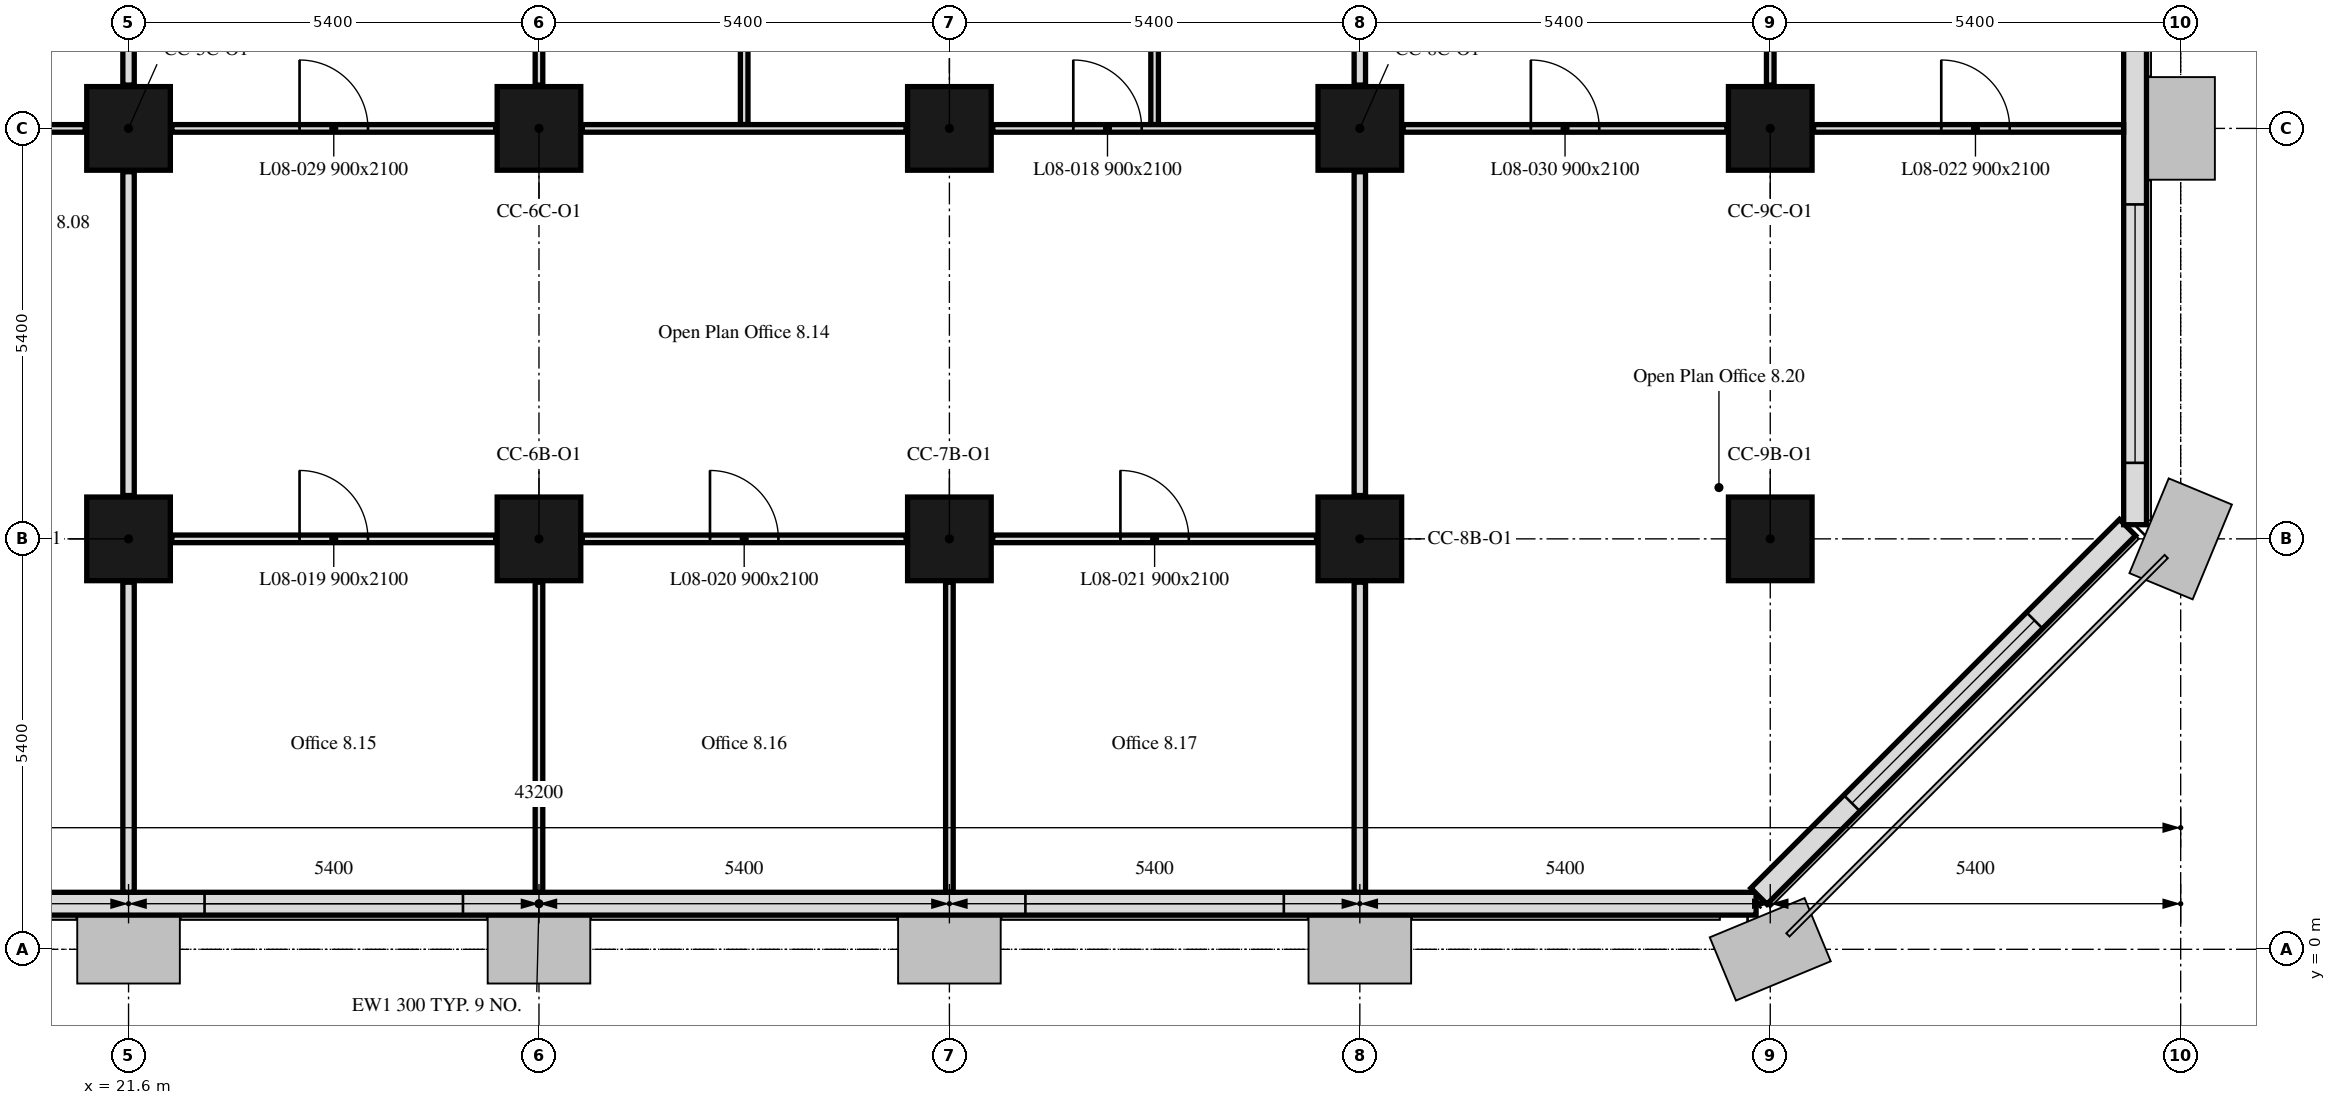
"""IFC4 building model, lengths in metres.
Left out: names, types, materials, properties, quantities, classifications, styles, units other than length and angle.
Written with IfcOpenShell. Run it as: python <this file> out.ifc"""

import sys

from ifc_helpers import new_model, si_unit, direction, frame, frame_2d, origin, origin_2d, place, context, subcontext, project, spatial, rectangle, extrude, element, fill, save


model = new_model("IFC4")
c1 = context("Model", 3, precision=1e-05, world=origin(), true_north=direction((0.0, 1.0)))
c2 = subcontext(c1, "Body", "Model", "MODEL_VIEW")
j1 = project(units=[si_unit("LENGTHUNIT", "METRE"), si_unit("PLANEANGLEUNIT", "RADIAN")], contexts=[c1])
p1 = place(None, origin())
s1 = spatial("IfcSite", under=j1, at=p1, CompositionType="ELEMENT")
p2 = place(p1, origin())
s2 = spatial("IfcBuilding", under=s1, at=p2, CompositionType="ELEMENT")
p3 = place(p2, frame((0.0, 0.0, 41.2)))
s3 = spatial("IfcBuildingStorey", under=s2, at=p3, CompositionType="ELEMENT", Elevation=41.2)
for number, where, z_axis, x_axis in (
    (1, (21.6, 5.4, 0.0), (0.0, 0.0, 1.0), (1.0, 0.0, 0.0)),
    (2, (27.0, 5.4, 0.0), (0.0, 0.0, 1.0), (1.0, 0.0, 0.0)),
    (3, (32.4, 5.4, 0.0), (0.0, 0.0, 1.0), (1.0, 0.0, 0.0)),
    (4, (37.8, 5.4, 0.0), (0.0, 0.0, 1.0), (1.0, 0.0, 0.0)),
    (5, (43.2, 5.4, 0.0), (0.0, 0.0, 1.0), (1.0, 0.0, 0.0)),
    (6, (21.6, 10.8, 0.0), (0.0, 0.0, 1.0), (1.0, 0.0, 0.0)),
    (7, (27.0, 10.8, 0.0), (0.0, 0.0, 1.0), (1.0, 0.0, 0.0)),
    (8, (32.4, 10.8, 0.0), (0.0, 0.0, 1.0), (1.0, 0.0, 0.0)),
    (9, (37.8, 10.8, 0.0), (0.0, 0.0, 1.0), (1.0, 0.0, 0.0)),
    (10, (43.2, 10.8, 0.0), (0.0, 0.0, 1.0), (1.0, 0.0, 0.0)),
):
    element("IfcColumn", number, at=place(p3, frame(where, z_axis=z_axis, x_axis=x_axis)), inside=s3, PredefinedType="COLUMN", context=c2, shape_type="SweptSolid", body=[
        extrude(rectangle(XDim=1.1, YDim=1.1, at=origin_2d()), origin(), (0.0, 0.0, 1.0), 3.5),
    ])
p4 = place(p3, frame((10.986, 0.6, 0.0), z_axis=(0.0, 0.0, 1.0), x_axis=(1.0, 0.0, 0.0)))
e11 = element("IfcWall", 11, at=p4, inside=s3, PredefinedType="SOLIDWALL", context=c2, shape_type="SweptSolid", body=[
    extrude(rectangle(XDim=32.027, YDim=0.3, at=frame_2d((16.014, 0.0))), origin(), (0.0, 0.0, 1.0), 3.5),
])
p5 = place(p4, frame((0.814, 0.0, 0.9)))
e12 = element("IfcOpeningElement", 12, at=p5, cuts=e11, PredefinedType="OPENING", context=c2, shape_type="SweptSolid", body=[
    extrude(rectangle(XDim=3.4, YDim=1.7, at=frame_2d((1.7, 0.85))), frame((0.0, 0.16, 0.0), z_axis=(0.0, -1.0, 0.0), x_axis=(1.0, 0.0, 0.0)), (0.0, 0.0, 1.0), 0.32),
])
p6 = place(p4, frame((11.614, 0.0, 0.9)))
e13 = element("IfcOpeningElement", 13, at=p6, cuts=e11, PredefinedType="OPENING", context=c2, shape_type="SweptSolid", body=[
    extrude(rectangle(XDim=3.4, YDim=1.7, at=frame_2d((1.7, 0.85))), frame((0.0, 0.16, 0.0), z_axis=(0.0, -1.0, 0.0), x_axis=(1.0, 0.0, 0.0)), (0.0, 0.0, 1.0), 0.32),
])
p7 = place(p4, frame((22.414, 0.0, 0.9)))
e14 = element("IfcOpeningElement", 14, at=p7, cuts=e11, PredefinedType="OPENING", context=c2, shape_type="SweptSolid", body=[
    extrude(rectangle(XDim=3.4, YDim=1.7, at=frame_2d((1.7, 0.85))), frame((0.0, 0.16, 0.0), z_axis=(0.0, -1.0, 0.0), x_axis=(1.0, 0.0, 0.0)), (0.0, 0.0, 1.0), 0.32),
])
p8 = place(p3, frame((43.051, 0.699, 0.0), z_axis=(0.0, 0.0, 1.0), x_axis=(0.707106781187, 0.707106781187, 0.0)))
e15 = element("IfcWall", 15, at=p8, inside=s3, PredefinedType="SOLIDWALL", context=c2, shape_type="SweptSolid", body=[
    extrude(rectangle(XDim=6.86, YDim=0.3, at=frame_2d((3.43, 0.0))), origin(), (0.0, 0.0, 1.0), 3.5),
])
p9 = place(p8, frame((1.73, 0.0, 0.9)))
e16 = element("IfcOpeningElement", 16, at=p9, cuts=e15, PredefinedType="OPENING", context=c2, shape_type="SweptSolid", body=[
    extrude(rectangle(XDim=3.4, YDim=1.7, at=frame_2d((1.7, 0.85))), frame((0.0, 0.16, 0.0), z_axis=(0.0, -1.0, 0.0), x_axis=(1.0, 0.0, 0.0)), (0.0, 0.0, 1.0), 0.32),
])
p10 = place(p3, frame((48.0, 5.586, 0.0), z_axis=(0.0, 0.0, 1.0), x_axis=(0.0, 1.0, 0.0)))
e17 = element("IfcWall", 17, at=p10, inside=s3, PredefinedType="SOLIDWALL", context=c2, shape_type="SweptSolid", body=[
    extrude(rectangle(XDim=32.027, YDim=0.3, at=frame_2d((16.014, 0.0))), origin(), (0.0, 0.0, 1.0), 3.5),
])
p11 = place(p10, frame((0.814, 0.0, 0.9)))
e18 = element("IfcOpeningElement", 18, at=p11, cuts=e17, PredefinedType="OPENING", context=c2, shape_type="SweptSolid", body=[
    extrude(rectangle(XDim=3.4, YDim=1.7, at=frame_2d((1.7, 0.85))), frame((0.0, 0.16, 0.0), z_axis=(0.0, -1.0, 0.0), x_axis=(1.0, 0.0, 0.0)), (0.0, 0.0, 1.0), 0.32),
])
p12 = place(p10, frame((11.614, 0.0, 0.9)))
e19 = element("IfcOpeningElement", 19, at=p12, cuts=e17, PredefinedType="OPENING", context=c2, shape_type="SweptSolid", body=[
    extrude(rectangle(XDim=3.4, YDim=1.7, at=frame_2d((1.7, 0.85))), frame((0.0, 0.16, 0.0), z_axis=(0.0, -1.0, 0.0), x_axis=(1.0, 0.0, 0.0)), (0.0, 0.0, 1.0), 0.32),
])
p13 = place(p10, frame((22.414, 0.0, 0.9)))
e20 = element("IfcOpeningElement", 20, at=p13, cuts=e17, PredefinedType="OPENING", context=c2, shape_type="SweptSolid", body=[
    extrude(rectangle(XDim=3.4, YDim=1.7, at=frame_2d((1.7, 0.85))), frame((0.0, 0.16, 0.0), z_axis=(0.0, -1.0, 0.0), x_axis=(1.0, 0.0, 0.0)), (0.0, 0.0, 1.0), 0.32),
])
p14 = place(p3, frame((16.77, 10.8, 0.0), z_axis=(0.0, 0.0, 1.0), x_axis=(1.0, 0.0, 0.0)))
e21 = element("IfcWall", 21, at=p14, inside=s3, PredefinedType="PARTITIONING", context=c2, shape_type="SweptSolid", body=[
    extrude(rectangle(XDim=4.26, YDim=0.1, at=frame_2d((2.13, 0.0))), origin(), (0.0, 0.0, 1.0), 3.5),
])
p15 = place(p3, frame((21.6, 11.37, 0.0), z_axis=(0.0, 0.0, 1.0), x_axis=(0.0, 1.0, 0.0)))
e22 = element("IfcWall", 22, at=p15, inside=s3, PredefinedType="PARTITIONING", context=c2, shape_type="SweptSolid", body=[
    extrude(rectangle(XDim=2.055, YDim=0.15, at=frame_2d((1.027, 0.0))), origin(), (0.0, 0.0, 1.0), 2.75),
])
p16 = place(p3, frame((21.6, 0.751, 0.0), z_axis=(0.0, 0.0, 1.0), x_axis=(0.0, 1.0, 0.0)))
e23 = element("IfcWall", 23, at=p16, inside=s3, PredefinedType="PARTITIONING", context=c2, shape_type="SweptSolid", body=[
    extrude(rectangle(XDim=4.079, YDim=0.15, at=frame_2d((2.04, 0.0))), origin(), (0.0, 0.0, 1.0), 2.75),
])
p17 = place(p3, frame((21.6, 5.97, 0.0), z_axis=(0.0, 0.0, 1.0), x_axis=(0.0, 1.0, 0.0)))
e24 = element("IfcWall", 24, at=p17, inside=s3, PredefinedType="PARTITIONING", context=c2, shape_type="SweptSolid", body=[
    extrude(rectangle(XDim=4.26, YDim=0.15, at=frame_2d((2.13, 0.0))), origin(), (0.0, 0.0, 1.0), 2.75),
])
p18 = place(p3, frame((22.17, 10.8, 0.0), z_axis=(0.0, 0.0, 1.0), x_axis=(1.0, 0.0, 0.0)))
e25 = element("IfcWall", 25, at=p18, inside=s3, PredefinedType="PARTITIONING", context=c2, shape_type="SweptSolid", body=[
    extrude(rectangle(XDim=4.26, YDim=0.1, at=frame_2d((2.13, 0.0))), origin(), (0.0, 0.0, 1.0), 3.5),
])
p19 = place(p18, frame((1.68, 0.0, 0.0)))
e26 = element("IfcOpeningElement", 26, at=p19, cuts=e25, PredefinedType="OPENING", context=c2, shape_type="SweptSolid", body=[
    extrude(rectangle(XDim=0.9, YDim=2.1, at=frame_2d((0.45, 1.05))), frame((0.0, 0.05, 0.0), z_axis=(0.0, -1.0, 0.0), x_axis=(1.0, 0.0, 0.0)), (0.0, 0.0, 1.0), 0.1),
])
p20 = place(p3, frame((27.0, 11.37, 0.0), z_axis=(0.0, 0.0, 1.0), x_axis=(0.0, 1.0, 0.0)))
e27 = element("IfcWall", 27, at=p20, inside=s3, PredefinedType="PARTITIONING", context=c2, shape_type="SweptSolid", body=[
    extrude(rectangle(XDim=2.055, YDim=0.1, at=frame_2d((1.027, 0.0))), origin(), (0.0, 0.0, 1.0), 2.75),
])
p21 = place(p3, frame((29.7, 10.85, 0.0), z_axis=(0.0, 0.0, 1.0), x_axis=(0.0, 1.0, 0.0)))
e28 = element("IfcWall", 28, at=p21, inside=s3, PredefinedType="PARTITIONING", context=c2, shape_type="SweptSolid", body=[
    extrude(rectangle(XDim=2.575, YDim=0.1, at=frame_2d((1.288, 0.0))), origin(), (0.0, 0.0, 1.0), 3.5),
])
p22 = place(p3, frame((27.57, 10.8, 0.0), z_axis=(0.0, 0.0, 1.0), x_axis=(1.0, 0.0, 0.0)))
e29 = element("IfcWall", 29, at=p22, inside=s3, PredefinedType="PARTITIONING", context=c2, shape_type="SweptSolid", body=[
    extrude(rectangle(XDim=4.26, YDim=0.1, at=frame_2d((2.13, 0.0))), origin(), (0.0, 0.0, 1.0), 3.5),
])
p23 = place(p3, frame((35.1, 10.85, 0.0), z_axis=(0.0, 0.0, 1.0), x_axis=(0.0, 1.0, 0.0)))
e30 = element("IfcWall", 30, at=p23, inside=s3, PredefinedType="PARTITIONING", context=c2, shape_type="SweptSolid", body=[
    extrude(rectangle(XDim=2.575, YDim=0.1, at=frame_2d((1.288, 0.0))), origin(), (0.0, 0.0, 1.0), 3.5),
])
p24 = place(p3, frame((32.97, 10.8, 0.0), z_axis=(0.0, 0.0, 1.0), x_axis=(1.0, 0.0, 0.0)))
e31 = element("IfcWall", 31, at=p24, inside=s3, PredefinedType="PARTITIONING", context=c2, shape_type="SweptSolid", body=[
    extrude(rectangle(XDim=4.26, YDim=0.1, at=frame_2d((2.13, 0.0))), origin(), (0.0, 0.0, 1.0), 2.75),
])
p25 = place(p24, frame((1.06, 0.0, 0.0)))
e32 = element("IfcOpeningElement", 32, at=p25, cuts=e31, PredefinedType="OPENING", context=c2, shape_type="SweptSolid", body=[
    extrude(rectangle(XDim=0.9, YDim=2.1, at=frame_2d((0.45, 1.05))), frame((0.0, 0.05, 0.0), z_axis=(0.0, -1.0, 0.0), x_axis=(1.0, 0.0, 0.0)), (0.0, 0.0, 1.0), 0.1),
])
p26 = place(p3, frame((37.8, 11.37, 0.0), z_axis=(0.0, 0.0, 1.0), x_axis=(0.0, 1.0, 0.0)))
e33 = element("IfcWall", 33, at=p26, inside=s3, PredefinedType="PARTITIONING", context=c2, shape_type="SweptSolid", body=[
    extrude(rectangle(XDim=2.055, YDim=0.15, at=frame_2d((1.027, 0.0))), origin(), (0.0, 0.0, 1.0), 2.75),
])
p27 = place(p3, frame((22.17, 5.4, 0.0), z_axis=(0.0, 0.0, 1.0), x_axis=(1.0, 0.0, 0.0)))
e34 = element("IfcWall", 34, at=p27, inside=s3, PredefinedType="PARTITIONING", context=c2, shape_type="SweptSolid", body=[
    extrude(rectangle(XDim=4.26, YDim=0.1, at=frame_2d((2.13, 0.0))), origin(), (0.0, 0.0, 1.0), 3.5),
])
p28 = place(p27, frame((1.68, 0.0, 0.0)))
e35 = element("IfcOpeningElement", 35, at=p28, cuts=e34, PredefinedType="OPENING", context=c2, shape_type="SweptSolid", body=[
    extrude(rectangle(XDim=0.9, YDim=2.1, at=frame_2d((0.45, 1.05))), frame((0.0, 0.05, 0.0), z_axis=(0.0, -1.0, 0.0), x_axis=(1.0, 0.0, 0.0)), (0.0, 0.0, 1.0), 0.1),
])
p29 = place(p3, frame((27.57, 5.4, 0.0), z_axis=(0.0, 0.0, 1.0), x_axis=(1.0, 0.0, 0.0)))
e36 = element("IfcWall", 36, at=p29, inside=s3, PredefinedType="PARTITIONING", context=c2, shape_type="SweptSolid", body=[
    extrude(rectangle(XDim=4.26, YDim=0.1, at=frame_2d((2.13, 0.0))), origin(), (0.0, 0.0, 1.0), 3.5),
])
p30 = place(p29, frame((1.68, 0.0, 0.0)))
e37 = element("IfcOpeningElement", 37, at=p30, cuts=e36, PredefinedType="OPENING", context=c2, shape_type="SweptSolid", body=[
    extrude(rectangle(XDim=0.9, YDim=2.1, at=frame_2d((0.45, 1.05))), frame((0.0, 0.05, 0.0), z_axis=(0.0, -1.0, 0.0), x_axis=(1.0, 0.0, 0.0)), (0.0, 0.0, 1.0), 0.1),
])
p31 = place(p3, frame((32.97, 5.4, 0.0), z_axis=(0.0, 0.0, 1.0), x_axis=(1.0, 0.0, 0.0)))
e38 = element("IfcWall", 38, at=p31, inside=s3, PredefinedType="PARTITIONING", context=c2, shape_type="SweptSolid", body=[
    extrude(rectangle(XDim=4.26, YDim=0.1, at=frame_2d((2.13, 0.0))), origin(), (0.0, 0.0, 1.0), 3.5),
])
p32 = place(p31, frame((1.68, 0.0, 0.0)))
e39 = element("IfcOpeningElement", 39, at=p32, cuts=e38, PredefinedType="OPENING", context=c2, shape_type="SweptSolid", body=[
    extrude(rectangle(XDim=0.9, YDim=2.1, at=frame_2d((0.45, 1.05))), frame((0.0, 0.05, 0.0), z_axis=(0.0, -1.0, 0.0), x_axis=(1.0, 0.0, 0.0)), (0.0, 0.0, 1.0), 0.1),
])
p33 = place(p3, frame((37.8, 5.97, 0.0), z_axis=(0.0, 0.0, 1.0), x_axis=(0.0, 1.0, 0.0)))
e40 = element("IfcWall", 40, at=p33, inside=s3, PredefinedType="PARTITIONING", context=c2, shape_type="SweptSolid", body=[
    extrude(rectangle(XDim=4.26, YDim=0.15, at=frame_2d((2.13, 0.0))), origin(), (0.0, 0.0, 1.0), 2.75),
])
for number, where, z_axis, x_axis in (
    (41, (27.0, 0.751, 0.0), (0.0, 0.0, 1.0), (0.0, 1.0, 0.0)),
    (42, (32.4, 0.751, 0.0), (0.0, 0.0, 1.0), (0.0, 1.0, 0.0)),
):
    element("IfcWall", number, at=place(p3, frame(where, z_axis=z_axis, x_axis=x_axis)), inside=s3, PredefinedType="PARTITIONING", context=c2, shape_type="SweptSolid", body=[
        extrude(rectangle(XDim=4.079, YDim=0.1, at=frame_2d((2.04, 0.0))), origin(), (0.0, 0.0, 1.0), 2.75),
    ])
p34 = place(p3, frame((37.8, 0.751, 0.0), z_axis=(0.0, 0.0, 1.0), x_axis=(0.0, 1.0, 0.0)))
e43 = element("IfcWall", 43, at=p34, inside=s3, PredefinedType="PARTITIONING", context=c2, shape_type="SweptSolid", body=[
    extrude(rectangle(XDim=4.079, YDim=0.15, at=frame_2d((2.04, 0.0))), origin(), (0.0, 0.0, 1.0), 2.75),
])
p35 = place(p3, frame((38.37, 10.8, 0.0), z_axis=(0.0, 0.0, 1.0), x_axis=(1.0, 0.0, 0.0)))
e44 = element("IfcWall", 44, at=p35, inside=s3, PredefinedType="PARTITIONING", context=c2, shape_type="SweptSolid", body=[
    extrude(rectangle(XDim=4.26, YDim=0.1, at=frame_2d((2.13, 0.0))), origin(), (0.0, 0.0, 1.0), 2.75),
])
p36 = place(p35, frame((1.68, 0.0, 0.0)))
e45 = element("IfcOpeningElement", 45, at=p36, cuts=e44, PredefinedType="OPENING", context=c2, shape_type="SweptSolid", body=[
    extrude(rectangle(XDim=0.9, YDim=2.1, at=frame_2d((0.45, 1.05))), frame((0.0, 0.05, 0.0), z_axis=(0.0, -1.0, 0.0), x_axis=(1.0, 0.0, 0.0)), (0.0, 0.0, 1.0), 0.1),
])
p37 = place(p3, frame((43.2, 11.37, 0.0), z_axis=(0.0, 0.0, 1.0), x_axis=(0.0, 1.0, 0.0)))
e46 = element("IfcWall", 46, at=p37, inside=s3, PredefinedType="PARTITIONING", context=c2, shape_type="SweptSolid", body=[
    extrude(rectangle(XDim=2.055, YDim=0.1, at=frame_2d((1.027, 0.0))), origin(), (0.0, 0.0, 1.0), 3.5),
])
p38 = place(p3, frame((43.77, 10.8, 0.0), z_axis=(0.0, 0.0, 1.0), x_axis=(1.0, 0.0, 0.0)))
e47 = element("IfcWall", 47, at=p38, inside=s3, PredefinedType="PARTITIONING", context=c2, shape_type="SweptSolid", body=[
    extrude(rectangle(XDim=4.079, YDim=0.1, at=frame_2d((2.04, 0.0))), origin(), (0.0, 0.0, 1.0), 2.75),
])
p39 = place(p38, frame((1.68, 0.0, 0.0)))
e48 = element("IfcOpeningElement", 48, at=p39, cuts=e47, PredefinedType="OPENING", context=c2, shape_type="SweptSolid", body=[
    extrude(rectangle(XDim=0.9, YDim=2.1, at=frame_2d((0.45, 1.05))), frame((0.0, 0.05, 0.0), z_axis=(0.0, -1.0, 0.0), x_axis=(1.0, 0.0, 0.0)), (0.0, 0.0, 1.0), 0.1),
])
p40 = place(p6, origin())
e49 = element("IfcWindow", 49, at=p40, inside=s3, PartitioningType="SINGLE_PANEL", PredefinedType="WINDOW", context=c2, shape_type="SweptSolid", body=[
    extrude(rectangle(XDim=3.4, YDim=1.7, at=frame_2d((1.7, 0.85))), frame((0.0, 0.03, 0.0), z_axis=(0.0, -1.0, 0.0), x_axis=(1.0, 0.0, 0.0)), (0.0, 0.0, 1.0), 0.06),
])
fill(e13, e49)
p41 = place(p7, origin())
e50 = element("IfcWindow", 50, at=p41, inside=s3, PartitioningType="SINGLE_PANEL", PredefinedType="WINDOW", context=c2, shape_type="SweptSolid", body=[
    extrude(rectangle(XDim=3.4, YDim=1.7, at=frame_2d((1.7, 0.85))), frame((0.0, 0.03, 0.0), z_axis=(0.0, -1.0, 0.0), x_axis=(1.0, 0.0, 0.0)), (0.0, 0.0, 1.0), 0.06),
])
fill(e14, e50)
p42 = place(p9, origin())
e51 = element("IfcWindow", 51, at=p42, inside=s3, PartitioningType="SINGLE_PANEL", PredefinedType="WINDOW", context=c2, shape_type="SweptSolid", body=[
    extrude(rectangle(XDim=3.4, YDim=1.7, at=frame_2d((1.7, 0.85))), frame((0.0, 0.03, 0.0), z_axis=(0.0, -1.0, 0.0), x_axis=(1.0, 0.0, 0.0)), (0.0, 0.0, 1.0), 0.06),
])
fill(e16, e51)
p43 = place(p11, origin())
e52 = element("IfcWindow", 52, at=p43, inside=s3, PartitioningType="SINGLE_PANEL", PredefinedType="WINDOW", context=c2, shape_type="SweptSolid", body=[
    extrude(rectangle(XDim=3.4, YDim=1.7, at=frame_2d((1.7, 0.85))), frame((0.0, 0.03, 0.0), z_axis=(0.0, -1.0, 0.0), x_axis=(1.0, 0.0, 0.0)), (0.0, 0.0, 1.0), 0.06),
])
fill(e18, e52)
p44 = place(p25, origin())
e53 = element("IfcDoor", 53, at=p44, inside=s3, OperationType="SINGLE_SWING_LEFT", PredefinedType="DOOR", context=c2, shape_type="SweptSolid", body=[
    extrude(rectangle(XDim=0.9, YDim=2.1, at=frame_2d((0.45, 1.05))), frame((0.0, 0.025, 0.0), z_axis=(0.0, -1.0, 0.0), x_axis=(1.0, 0.0, 0.0)), (0.0, 0.0, 1.0), 0.05),
])
fill(e32, e53)
p45 = place(p28, origin())
e54 = element("IfcDoor", 54, at=p45, inside=s3, OperationType="SINGLE_SWING_LEFT", PredefinedType="DOOR", context=c2, shape_type="SweptSolid", body=[
    extrude(rectangle(XDim=0.9, YDim=2.1, at=frame_2d((0.45, 1.05))), frame((0.0, 0.025, 0.0), z_axis=(0.0, -1.0, 0.0), x_axis=(1.0, 0.0, 0.0)), (0.0, 0.0, 1.0), 0.05),
])
fill(e35, e54)
p46 = place(p30, origin())
e55 = element("IfcDoor", 55, at=p46, inside=s3, OperationType="SINGLE_SWING_LEFT", PredefinedType="DOOR", context=c2, shape_type="SweptSolid", body=[
    extrude(rectangle(XDim=0.9, YDim=2.1, at=frame_2d((0.45, 1.05))), frame((0.0, 0.025, 0.0), z_axis=(0.0, -1.0, 0.0), x_axis=(1.0, 0.0, 0.0)), (0.0, 0.0, 1.0), 0.05),
])
fill(e37, e55)
p47 = place(p32, origin())
e56 = element("IfcDoor", 56, at=p47, inside=s3, OperationType="SINGLE_SWING_LEFT", PredefinedType="DOOR", context=c2, shape_type="SweptSolid", body=[
    extrude(rectangle(XDim=0.9, YDim=2.1, at=frame_2d((0.45, 1.05))), frame((0.0, 0.025, 0.0), z_axis=(0.0, -1.0, 0.0), x_axis=(1.0, 0.0, 0.0)), (0.0, 0.0, 1.0), 0.05),
])
fill(e39, e56)
p48 = place(p39, origin())
e57 = element("IfcDoor", 57, at=p48, inside=s3, OperationType="SINGLE_SWING_RIGHT", PredefinedType="DOOR", context=c2, shape_type="SweptSolid", body=[
    extrude(rectangle(XDim=0.9, YDim=2.1, at=frame_2d((0.45, 1.05))), frame((0.0, 0.025, 0.0), z_axis=(0.0, -1.0, 0.0), x_axis=(1.0, 0.0, 0.0)), (0.0, 0.0, 1.0), 0.05),
])
fill(e48, e57)
p49 = place(p19, origin())
e58 = element("IfcDoor", 58, at=p49, inside=s3, OperationType="SINGLE_SWING_RIGHT", PredefinedType="DOOR", context=c2, shape_type="SweptSolid", body=[
    extrude(rectangle(XDim=0.9, YDim=2.1, at=frame_2d((0.45, 1.05))), frame((0.0, 0.025, 0.0), z_axis=(0.0, -1.0, 0.0), x_axis=(1.0, 0.0, 0.0)), (0.0, 0.0, 1.0), 0.05),
])
fill(e26, e58)
p50 = place(p36, origin())
e59 = element("IfcDoor", 59, at=p50, inside=s3, OperationType="SINGLE_SWING_LEFT", PredefinedType="DOOR", context=c2, shape_type="SweptSolid", body=[
    extrude(rectangle(XDim=0.9, YDim=2.1, at=frame_2d((0.45, 1.05))), frame((0.0, 0.025, 0.0), z_axis=(0.0, -1.0, 0.0), x_axis=(1.0, 0.0, 0.0)), (0.0, 0.0, 1.0), 0.05),
])
fill(e45, e59)
save(model, sys.argv[1])
